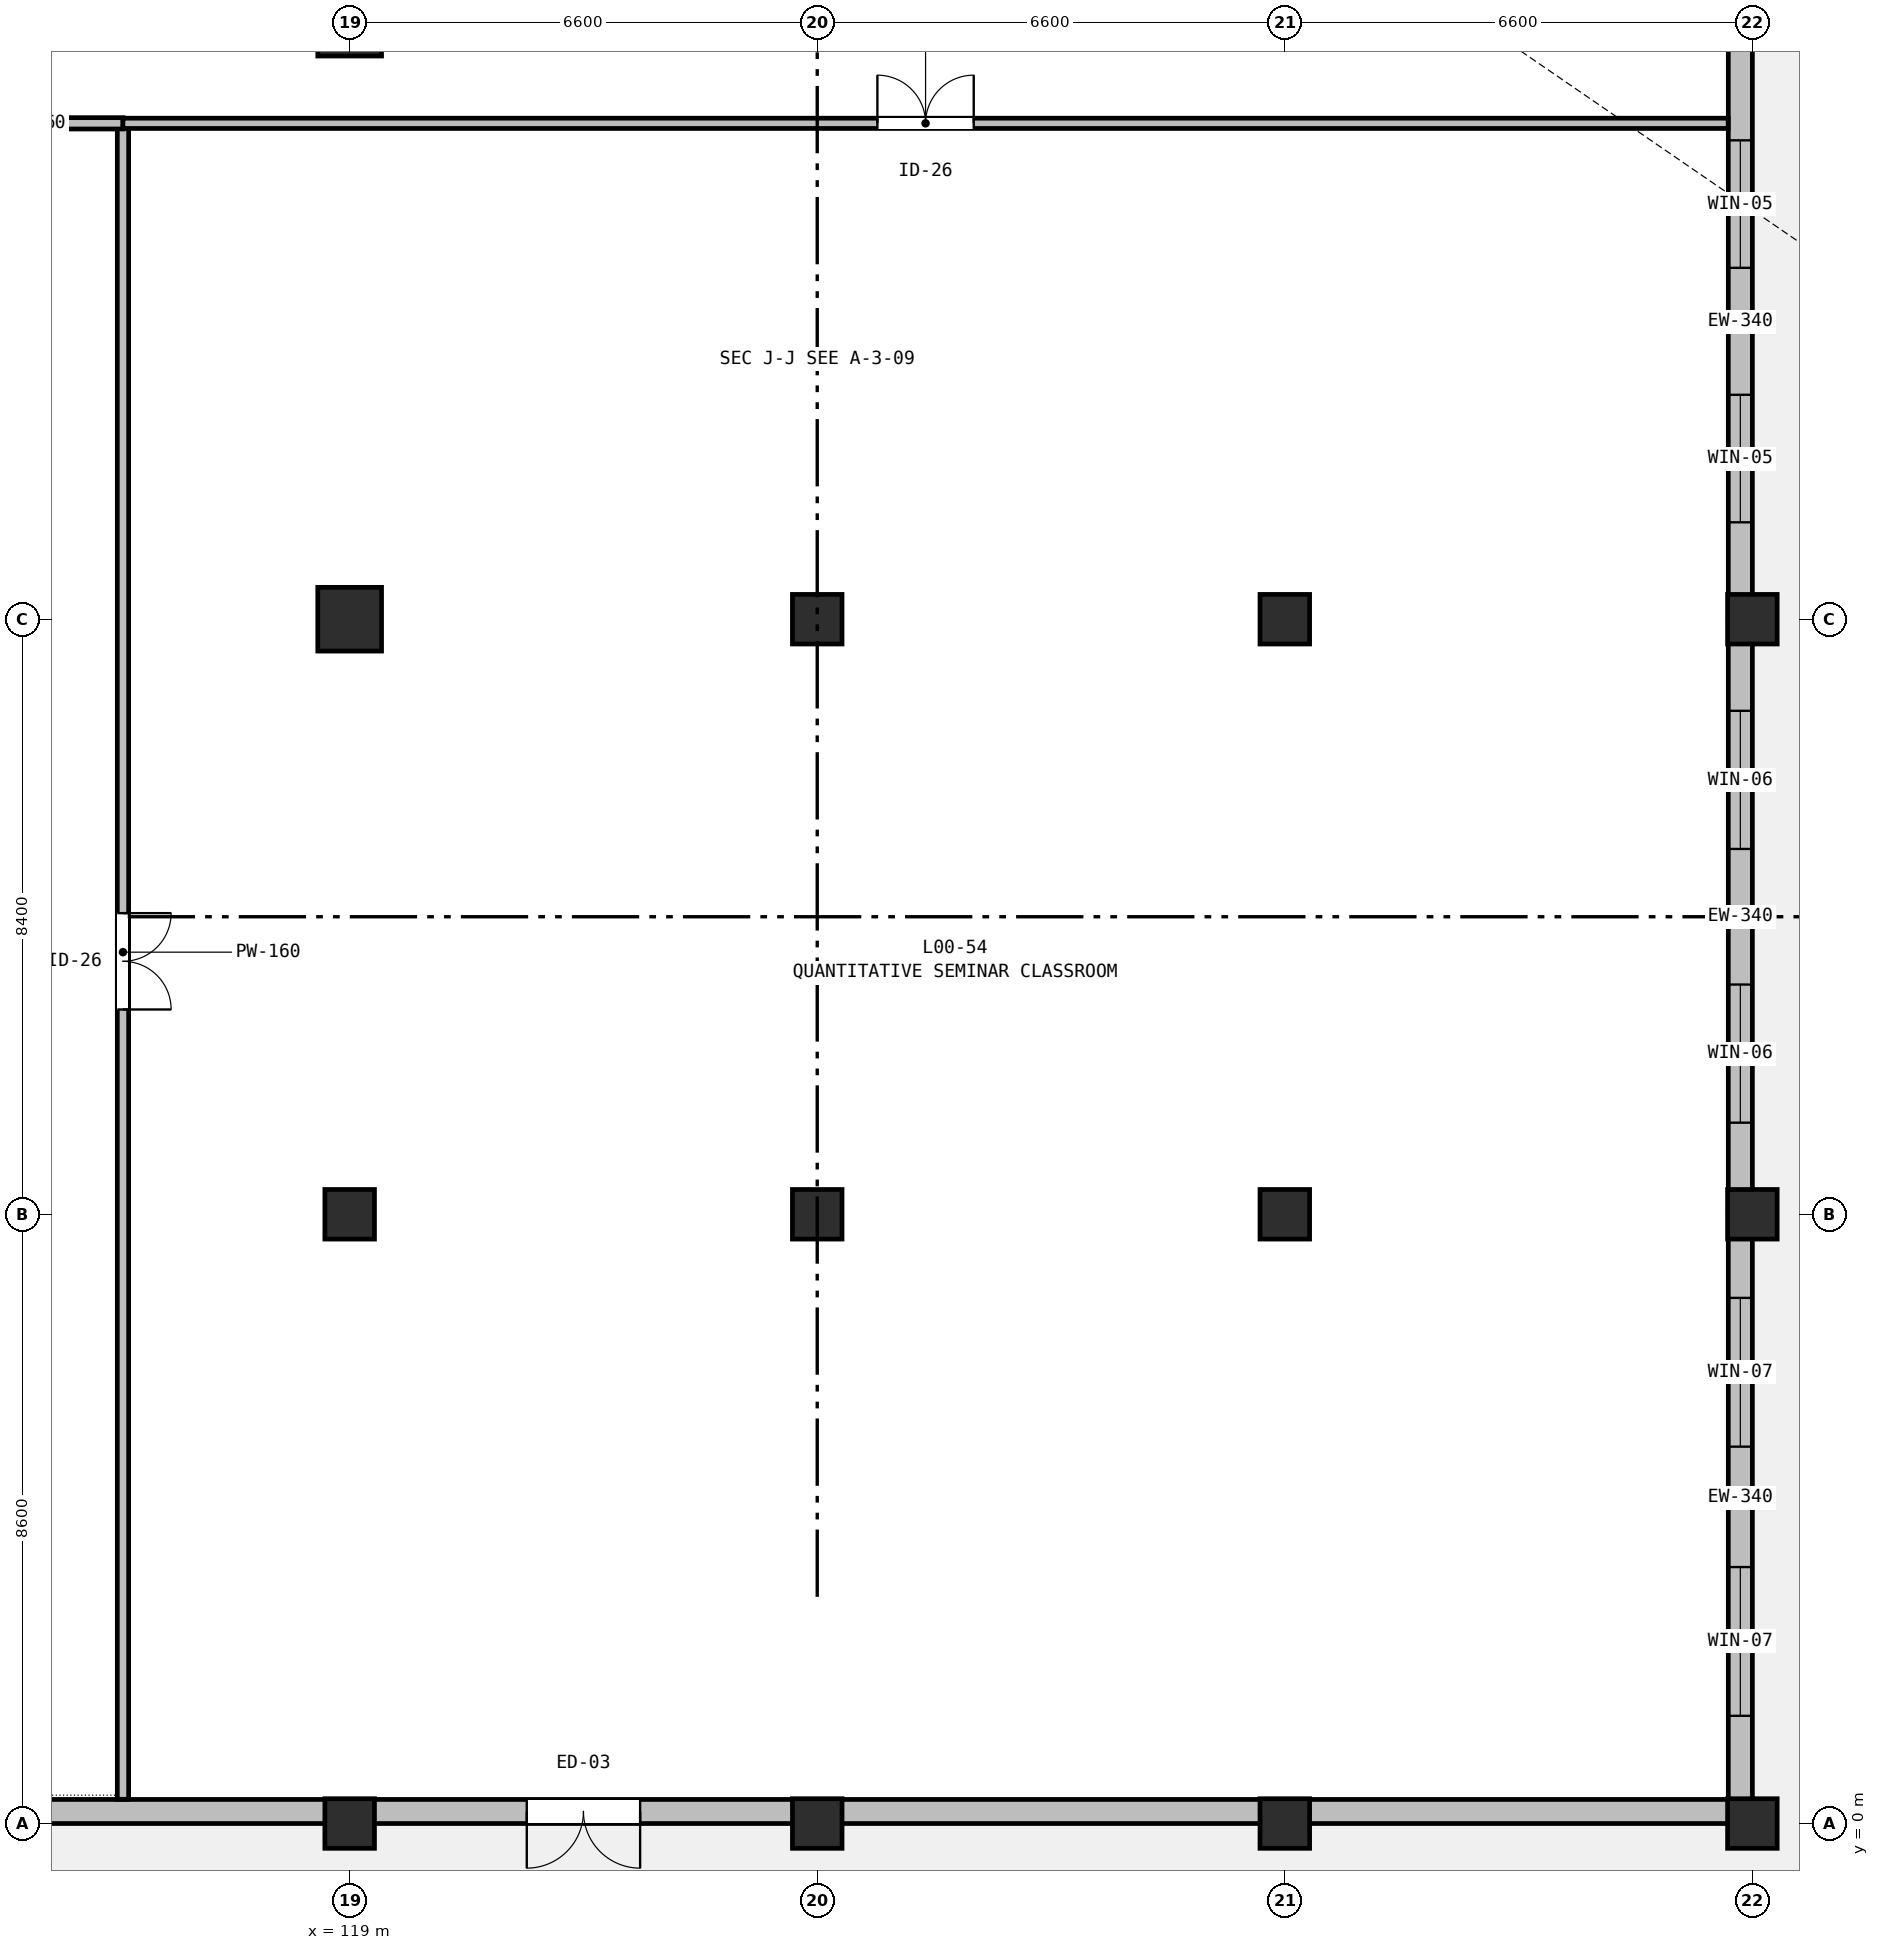
"""IFC4 building model, lengths in metres.
Left out: names, types, materials, properties, quantities, classifications, styles, units other than length and angle.
Written with IfcOpenShell. Run it as: python <this file> out.ifc"""

import sys

from ifc_helpers import new_model, si_unit, direction, frame, frame_2d, origin, origin_2d, place, context, subcontext, project, spatial, rectangle, extrude, element, fill, save


model = new_model("IFC4")
c1 = context("Model", 3, precision=1e-05, world=origin(), true_north=direction((0.0, 1.0)))
c2 = subcontext(c1, "Body", "Model", "MODEL_VIEW")
j1 = project(units=[si_unit("LENGTHUNIT", "METRE"), si_unit("PLANEANGLEUNIT", "RADIAN")], contexts=[c1])
p1 = place(None, origin())
s1 = spatial("IfcSite", under=j1, at=p1, CompositionType="ELEMENT")
p2 = place(p1, origin())
s2 = spatial("IfcBuilding", under=s1, at=p2, CompositionType="ELEMENT")
p3 = place(p2, origin())
s3 = spatial("IfcBuildingStorey", under=s2, at=p3, CompositionType="ELEMENT", Elevation=0.0)
p4 = place(p3, frame((119.0, 0.0, -0.32), z_axis=(0.0, 0.0, 1.0), x_axis=(1.0, 0.0, 0.0)))
e1 = element("IfcColumn", 1, at=p4, inside=s3, PredefinedType="COLUMN", context=c2, shape_type="SweptSolid", body=[
    extrude(rectangle(XDim=0.7, YDim=0.7, at=origin_2d()), origin(), (0.0, 0.0, 1.0), 5.66),
])
p5 = place(p3, frame((119.0, 8.6, -0.32), z_axis=(0.0, 0.0, 1.0), x_axis=(1.0, 0.0, 0.0)))
e2 = element("IfcColumn", 2, at=p5, inside=s3, PredefinedType="COLUMN", context=c2, shape_type="SweptSolid", body=[
    extrude(rectangle(XDim=0.7, YDim=0.7, at=origin_2d()), origin(), (0.0, 0.0, 1.0), 5.72),
])
p6 = place(p3, frame((119.0, 17.0, -0.32), z_axis=(0.0, 0.0, 1.0), x_axis=(1.0, 0.0, 0.0)))
e3 = element("IfcColumn", 3, at=p6, inside=s3, PredefinedType="COLUMN", context=c2, shape_type="SweptSolid", body=[
    extrude(rectangle(XDim=0.9, YDim=0.9, at=origin_2d()), origin(), (0.0, 0.0, 1.0), 5.72),
])
p7 = place(p3, frame((119.0, 25.4, 0.0), z_axis=(0.0, 0.0, 1.0), x_axis=(1.0, 0.0, 0.0)))
e4 = element("IfcColumn", 4, at=p7, inside=s3, PredefinedType="COLUMN", context=c2, shape_type="SweptSolid", body=[
    extrude(rectangle(XDim=0.9, YDim=0.9, at=origin_2d()), origin(), (0.0, 0.0, 1.0), 5.4),
])
p8 = place(p3, frame((125.6, 0.0, -0.32), z_axis=(0.0, 0.0, 1.0), x_axis=(1.0, 0.0, 0.0)))
e5 = element("IfcColumn", 5, at=p8, inside=s3, PredefinedType="COLUMN", context=c2, shape_type="SweptSolid", body=[
    extrude(rectangle(XDim=0.7, YDim=0.7, at=origin_2d()), origin(), (0.0, 0.0, 1.0), 5.66),
])
for number, where, z_axis, x_axis in (
    (6, (125.6, 8.6, -0.32), (0.0, 0.0, 1.0), (1.0, 0.0, 0.0)),
    (7, (125.6, 17.0, -0.32), (0.0, 0.0, 1.0), (1.0, 0.0, 0.0)),
):
    element("IfcColumn", number, at=place(p3, frame(where, z_axis=z_axis, x_axis=x_axis)), inside=s3, PredefinedType="COLUMN", context=c2, shape_type="SweptSolid", body=[
        extrude(rectangle(XDim=0.7, YDim=0.7, at=origin_2d()), origin(), (0.0, 0.0, 1.0), 5.72),
    ])
p9 = place(p3, frame((132.2, 0.0, -0.32), z_axis=(0.0, 0.0, 1.0), x_axis=(1.0, 0.0, 0.0)))
e8 = element("IfcColumn", 8, at=p9, inside=s3, PredefinedType="COLUMN", context=c2, shape_type="SweptSolid", body=[
    extrude(rectangle(XDim=0.7, YDim=0.7, at=origin_2d()), origin(), (0.0, 0.0, 1.0), 5.66),
])
for number, where, z_axis, x_axis in (
    (9, (132.2, 8.6, -0.32), (0.0, 0.0, 1.0), (1.0, 0.0, 0.0)),
    (10, (132.2, 17.0, -0.32), (0.0, 0.0, 1.0), (1.0, 0.0, 0.0)),
):
    element("IfcColumn", number, at=place(p3, frame(where, z_axis=z_axis, x_axis=x_axis)), inside=s3, PredefinedType="COLUMN", context=c2, shape_type="SweptSolid", body=[
        extrude(rectangle(XDim=0.7, YDim=0.7, at=origin_2d()), origin(), (0.0, 0.0, 1.0), 5.72),
    ])
p10 = place(p3, frame((138.8, 0.0, -0.32), z_axis=(0.0, 0.0, 1.0), x_axis=(1.0, 0.0, 0.0)))
e11 = element("IfcColumn", 11, at=p10, inside=s3, PredefinedType="COLUMN", context=c2, shape_type="SweptSolid", body=[
    extrude(rectangle(XDim=0.7, YDim=0.7, at=origin_2d()), origin(), (0.0, 0.0, 1.0), 5.66),
])
for number, where, z_axis, x_axis in (
    (12, (138.8, 8.6, -0.32), (0.0, 0.0, 1.0), (1.0, 0.0, 0.0)),
    (13, (138.8, 17.0, -0.32), (0.0, 0.0, 1.0), (1.0, 0.0, 0.0)),
):
    element("IfcColumn", number, at=place(p3, frame(where, z_axis=z_axis, x_axis=x_axis)), inside=s3, PredefinedType="COLUMN", context=c2, shape_type="SweptSolid", body=[
        extrude(rectangle(XDim=0.7, YDim=0.7, at=origin_2d()), origin(), (0.0, 0.0, 1.0), 5.72),
    ])
p11 = place(p3, frame((138.63, 25.4, 0.0), z_axis=(0.0, 0.0, 1.0), x_axis=(0.0, -1.0, 0.0)))
e14 = element("IfcWall", 14, at=p11, inside=s3, PredefinedType="STANDARD", context=c2, shape_type="SweptSolid", body=[
    extrude(rectangle(XDim=8.4, YDim=0.34, at=frame_2d((4.2, 0.0))), origin(), (0.0, 0.0, 1.0), 4.685),
])
p12 = place(p11, frame((1.64, 0.0, 0.9)))
e15 = element("IfcOpeningElement", 15, at=p12, cuts=e14, PredefinedType="OPENING", context=c2, shape_type="SweptSolid", body=[
    extrude(rectangle(XDim=1.8, YDim=2.1, at=frame_2d((0.9, 1.05))), frame((0.0, 0.18, 0.0), z_axis=(0.0, -1.0, 0.0), x_axis=(1.0, 0.0, 0.0)), (0.0, 0.0, 1.0), 0.36),
])
p13 = place(p11, frame((5.232, 0.0, 0.9)))
e16 = element("IfcOpeningElement", 16, at=p13, cuts=e14, PredefinedType="OPENING", context=c2, shape_type="SweptSolid", body=[
    extrude(rectangle(XDim=1.8, YDim=2.1, at=frame_2d((0.9, 1.05))), frame((0.0, 0.18, 0.0), z_axis=(0.0, -1.0, 0.0), x_axis=(1.0, 0.0, 0.0)), (0.0, 0.0, 1.0), 0.36),
])
p14 = place(p3, frame((138.63, 17.0, 0.0), z_axis=(0.0, 0.0, 1.0), x_axis=(0.0, -1.0, 0.0)))
e17 = element("IfcWall", 17, at=p14, inside=s3, PredefinedType="STANDARD", context=c2, shape_type="SweptSolid", body=[
    extrude(rectangle(XDim=8.4, YDim=0.34, at=frame_2d((4.2, 0.0))), origin(), (0.0, 0.0, 1.0), 4.685),
])
p15 = place(p14, frame((1.293, 0.0, 0.9)))
e18 = element("IfcOpeningElement", 18, at=p15, cuts=e17, PredefinedType="OPENING", context=c2, shape_type="SweptSolid", body=[
    extrude(rectangle(XDim=1.95, YDim=2.1, at=frame_2d((0.975, 1.05))), frame((0.0, 0.18, 0.0), z_axis=(0.0, -1.0, 0.0), x_axis=(1.0, 0.0, 0.0)), (0.0, 0.0, 1.0), 0.36),
])
p16 = place(p14, frame((5.157, 0.0, 0.9)))
e19 = element("IfcOpeningElement", 19, at=p16, cuts=e17, PredefinedType="OPENING", context=c2, shape_type="SweptSolid", body=[
    extrude(rectangle(XDim=1.95, YDim=2.1, at=frame_2d((0.975, 1.05))), frame((0.0, 0.18, 0.0), z_axis=(0.0, -1.0, 0.0), x_axis=(1.0, 0.0, 0.0)), (0.0, 0.0, 1.0), 0.36),
])
p17 = place(p3, frame((138.63, 8.6, 0.0), z_axis=(0.0, 0.0, 1.0), x_axis=(0.0, -1.0, 0.0)))
e20 = element("IfcWall", 20, at=p17, inside=s3, PredefinedType="STANDARD", context=c2, shape_type="SweptSolid", body=[
    extrude(rectangle(XDim=8.26, YDim=0.34, at=frame_2d((4.13, 0.0))), origin(), (0.0, 0.0, 1.0), 4.685),
])
p18 = place(p17, frame((1.18, 0.0, 0.9)))
e21 = element("IfcOpeningElement", 21, at=p18, cuts=e20, PredefinedType="OPENING", context=c2, shape_type="SweptSolid", body=[
    extrude(rectangle(XDim=2.1, YDim=2.1, at=frame_2d((1.05, 1.05))), frame((0.0, 0.18, 0.0), z_axis=(0.0, -1.0, 0.0), x_axis=(1.0, 0.0, 0.0)), (0.0, 0.0, 1.0), 0.36),
])
p19 = place(p17, frame((4.98, 0.0, 0.9)))
e22 = element("IfcOpeningElement", 22, at=p19, cuts=e20, PredefinedType="OPENING", context=c2, shape_type="SweptSolid", body=[
    extrude(rectangle(XDim=2.1, YDim=2.1, at=frame_2d((1.05, 1.05))), frame((0.0, 0.18, 0.0), z_axis=(0.0, -1.0, 0.0), x_axis=(1.0, 0.0, 0.0)), (0.0, 0.0, 1.0), 0.36),
])
p20 = place(p3, frame((138.8, 0.17, 0.0), z_axis=(0.0, 0.0, 1.0), x_axis=(-1.0, 0.0, 0.0)))
e23 = element("IfcWall", 23, at=p20, inside=s3, PredefinedType="STANDARD", context=c2, shape_type="SweptSolid", body=[
    extrude(rectangle(XDim=6.6, YDim=0.34, at=frame_2d((3.3, 0.0))), origin(), (0.0, 0.0, 1.0), 4.535),
])
p21 = place(p3, frame((132.2, 0.17, 0.0), z_axis=(0.0, 0.0, 1.0), x_axis=(-1.0, 0.0, 0.0)))
e24 = element("IfcWall", 24, at=p21, inside=s3, PredefinedType="STANDARD", context=c2, shape_type="SweptSolid", body=[
    extrude(rectangle(XDim=6.6, YDim=0.34, at=frame_2d((3.3, 0.0))), origin(), (0.0, 0.0, 1.0), 4.535),
])
p22 = place(p3, frame((125.6, 0.17, 0.0), z_axis=(0.0, 0.0, 1.0), x_axis=(-1.0, 0.0, 0.0)))
e25 = element("IfcWall", 25, at=p22, inside=s3, PredefinedType="STANDARD", context=c2, shape_type="SweptSolid", body=[
    extrude(rectangle(XDim=6.6, YDim=0.34, at=frame_2d((3.3, 0.0))), origin(), (0.0, 0.0, 1.0), 4.535),
])
p23 = place(p22, frame((2.5, 0.0, 0.0)))
e26 = element("IfcOpeningElement", 26, at=p23, cuts=e25, PredefinedType="OPENING", context=c2, shape_type="SweptSolid", body=[
    extrude(rectangle(XDim=1.6, YDim=2.2, at=frame_2d((0.8, 1.1))), frame((0.0, 0.18, 0.0), z_axis=(0.0, -1.0, 0.0), x_axis=(1.0, 0.0, 0.0)), (0.0, 0.0, 1.0), 0.36),
])
p24 = place(p3, frame((119.0, 0.17, 0.0), z_axis=(0.0, 0.0, 1.0), x_axis=(-1.0, 0.0, 0.0)))
e27 = element("IfcWall", 27, at=p24, inside=s3, PredefinedType="STANDARD", context=c2, shape_type="SweptSolid", body=[
    extrude(rectangle(XDim=6.6, YDim=0.34, at=frame_2d((3.3, 0.0))), origin(), (0.0, 0.0, 1.0), 4.535),
])
p25 = place(p3, frame((115.8, 24.0, 0.0), z_axis=(0.0, 0.0, 1.0), x_axis=(0.0, -1.0, 0.0)))
e28 = element("IfcWall", 28, at=p25, inside=s3, PredefinedType="PARTITIONING", context=c2, shape_type="SweptSolid", body=[
    extrude(rectangle(XDim=23.658, YDim=0.16, at=frame_2d((11.829, 0.0))), origin(), (0.0, 0.0, 1.0), 4.435),
])
p26 = place(p25, frame((11.149, 0.0, 0.0)))
e29 = element("IfcOpeningElement", 29, at=p26, cuts=e28, PredefinedType="OPENING", context=c2, shape_type="SweptSolid", body=[
    extrude(rectangle(XDim=1.36, YDim=2.14, at=frame_2d((0.68, 1.07))), frame((0.0, 0.09, 0.0), z_axis=(0.0, -1.0, 0.0), x_axis=(1.0, 0.0, 0.0)), (0.0, 0.0, 1.0), 0.18),
])
p27 = place(p3, frame((102.4, 24.0, 0.0), z_axis=(0.0, 0.0, 1.0), x_axis=(1.0, 0.0, 0.0)))
e30 = element("IfcWall", 30, at=p27, inside=s3, PredefinedType="PARTITIONING", context=c2, shape_type="SweptSolid", body=[
    extrude(rectangle(XDim=13.4, YDim=0.16, at=frame_2d((6.7, 0.0))), origin(), (0.0, 0.0, 1.0), 4.535),
])
p28 = place(p27, frame((6.08, 0.0, 0.0)))
e31 = element("IfcOpeningElement", 31, at=p28, cuts=e30, PredefinedType="OPENING", context=c2, shape_type="SweptSolid", body=[
    extrude(rectangle(XDim=1.24, YDim=2.14, at=frame_2d((0.62, 1.07))), frame((0.0, 0.09, 0.0), z_axis=(0.0, -1.0, 0.0), x_axis=(1.0, 0.0, 0.0)), (0.0, 0.0, 1.0), 0.18),
])
p29 = place(p3, frame((115.8, 24.0, 0.0), z_axis=(0.0, 0.0, 1.0), x_axis=(1.0, 0.0, 0.0)))
e32 = element("IfcWall", 32, at=p29, inside=s3, PredefinedType="PARTITIONING", context=c2, shape_type="SweptSolid", body=[
    extrude(rectangle(XDim=22.658, YDim=0.145, at=frame_2d((11.329, 0.0))), origin(), (0.0, 0.0, 1.0), 4.535),
])
p30 = place(p29, frame((10.649, 0.0, 0.0)))
e33 = element("IfcOpeningElement", 33, at=p30, cuts=e32, PredefinedType="OPENING", context=c2, shape_type="SweptSolid", body=[
    extrude(rectangle(XDim=1.36, YDim=2.14, at=frame_2d((0.68, 1.07))), frame((0.0, 0.083, 0.0), z_axis=(0.0, -1.0, 0.0), x_axis=(1.0, 0.0, 0.0)), (0.0, 0.0, 1.0), 0.165),
])
p31 = place(p23, origin())
e34 = element("IfcDoor", 34, at=p31, inside=s3, OperationType="DOUBLE_DOOR_SINGLE_SWING", PredefinedType="DOOR", context=c2, shape_type="SweptSolid", body=[
    extrude(rectangle(XDim=1.6, YDim=2.2, at=frame_2d((0.8, 1.1))), frame((0.0, 0.025, 0.0), z_axis=(0.0, -1.0, 0.0), x_axis=(1.0, 0.0, 0.0)), (0.0, 0.0, 1.0), 0.05),
])
fill(e26, e34)
p32 = place(p12, origin())
e35 = element("IfcWindow", 35, at=p32, inside=s3, PartitioningType="SINGLE_PANEL", PredefinedType="WINDOW", context=c2, shape_type="SweptSolid", body=[
    extrude(rectangle(XDim=1.8, YDim=2.1, at=frame_2d((0.9, 1.05))), frame((0.0, 0.03, 0.0), z_axis=(0.0, -1.0, 0.0), x_axis=(1.0, 0.0, 0.0)), (0.0, 0.0, 1.0), 0.06),
])
fill(e15, e35)
p33 = place(p13, origin())
e36 = element("IfcWindow", 36, at=p33, inside=s3, PartitioningType="SINGLE_PANEL", PredefinedType="WINDOW", context=c2, shape_type="SweptSolid", body=[
    extrude(rectangle(XDim=1.8, YDim=2.1, at=frame_2d((0.9, 1.05))), frame((0.0, 0.03, 0.0), z_axis=(0.0, -1.0, 0.0), x_axis=(1.0, 0.0, 0.0)), (0.0, 0.0, 1.0), 0.06),
])
fill(e16, e36)
p34 = place(p15, origin())
e37 = element("IfcWindow", 37, at=p34, inside=s3, PartitioningType="SINGLE_PANEL", PredefinedType="WINDOW", context=c2, shape_type="SweptSolid", body=[
    extrude(rectangle(XDim=1.95, YDim=2.1, at=frame_2d((0.975, 1.05))), frame((0.0, 0.03, 0.0), z_axis=(0.0, -1.0, 0.0), x_axis=(1.0, 0.0, 0.0)), (0.0, 0.0, 1.0), 0.06),
])
fill(e18, e37)
p35 = place(p16, origin())
e38 = element("IfcWindow", 38, at=p35, inside=s3, PartitioningType="SINGLE_PANEL", PredefinedType="WINDOW", context=c2, shape_type="SweptSolid", body=[
    extrude(rectangle(XDim=1.95, YDim=2.1, at=frame_2d((0.975, 1.05))), frame((0.0, 0.03, 0.0), z_axis=(0.0, -1.0, 0.0), x_axis=(1.0, 0.0, 0.0)), (0.0, 0.0, 1.0), 0.06),
])
fill(e19, e38)
p36 = place(p18, origin())
e39 = element("IfcWindow", 39, at=p36, inside=s3, PartitioningType="SINGLE_PANEL", PredefinedType="WINDOW", context=c2, shape_type="SweptSolid", body=[
    extrude(rectangle(XDim=2.1, YDim=2.1, at=frame_2d((1.05, 1.05))), frame((0.0, 0.03, 0.0), z_axis=(0.0, -1.0, 0.0), x_axis=(1.0, 0.0, 0.0)), (0.0, 0.0, 1.0), 0.06),
])
fill(e21, e39)
p37 = place(p19, origin())
e40 = element("IfcWindow", 40, at=p37, inside=s3, PartitioningType="SINGLE_PANEL", PredefinedType="WINDOW", context=c2, shape_type="SweptSolid", body=[
    extrude(rectangle(XDim=2.1, YDim=2.1, at=frame_2d((1.05, 1.05))), frame((0.0, 0.03, 0.0), z_axis=(0.0, -1.0, 0.0), x_axis=(1.0, 0.0, 0.0)), (0.0, 0.0, 1.0), 0.06),
])
fill(e22, e40)
p38 = place(p30, origin())
e41 = element("IfcDoor", 41, at=p38, inside=s3, OperationType="DOUBLE_DOOR_SINGLE_SWING", PredefinedType="DOOR", context=c2, shape_type="SweptSolid", body=[
    extrude(rectangle(XDim=1.36, YDim=2.14, at=frame_2d((0.68, 1.07))), frame((0.0, 0.025, 0.0), z_axis=(0.0, -1.0, 0.0), x_axis=(1.0, 0.0, 0.0)), (0.0, 0.0, 1.0), 0.05),
])
fill(e33, e41)
p39 = place(p26, origin())
e42 = element("IfcDoor", 42, at=p39, inside=s3, OperationType="DOUBLE_DOOR_SINGLE_SWING", PredefinedType="DOOR", context=c2, shape_type="SweptSolid", body=[
    extrude(rectangle(XDim=1.36, YDim=2.14, at=frame_2d((0.68, 1.07))), frame((0.0, 0.025, 0.0), z_axis=(0.0, -1.0, 0.0), x_axis=(1.0, 0.0, 0.0)), (0.0, 0.0, 1.0), 0.05),
])
fill(e29, e42)
save(model, sys.argv[1])
